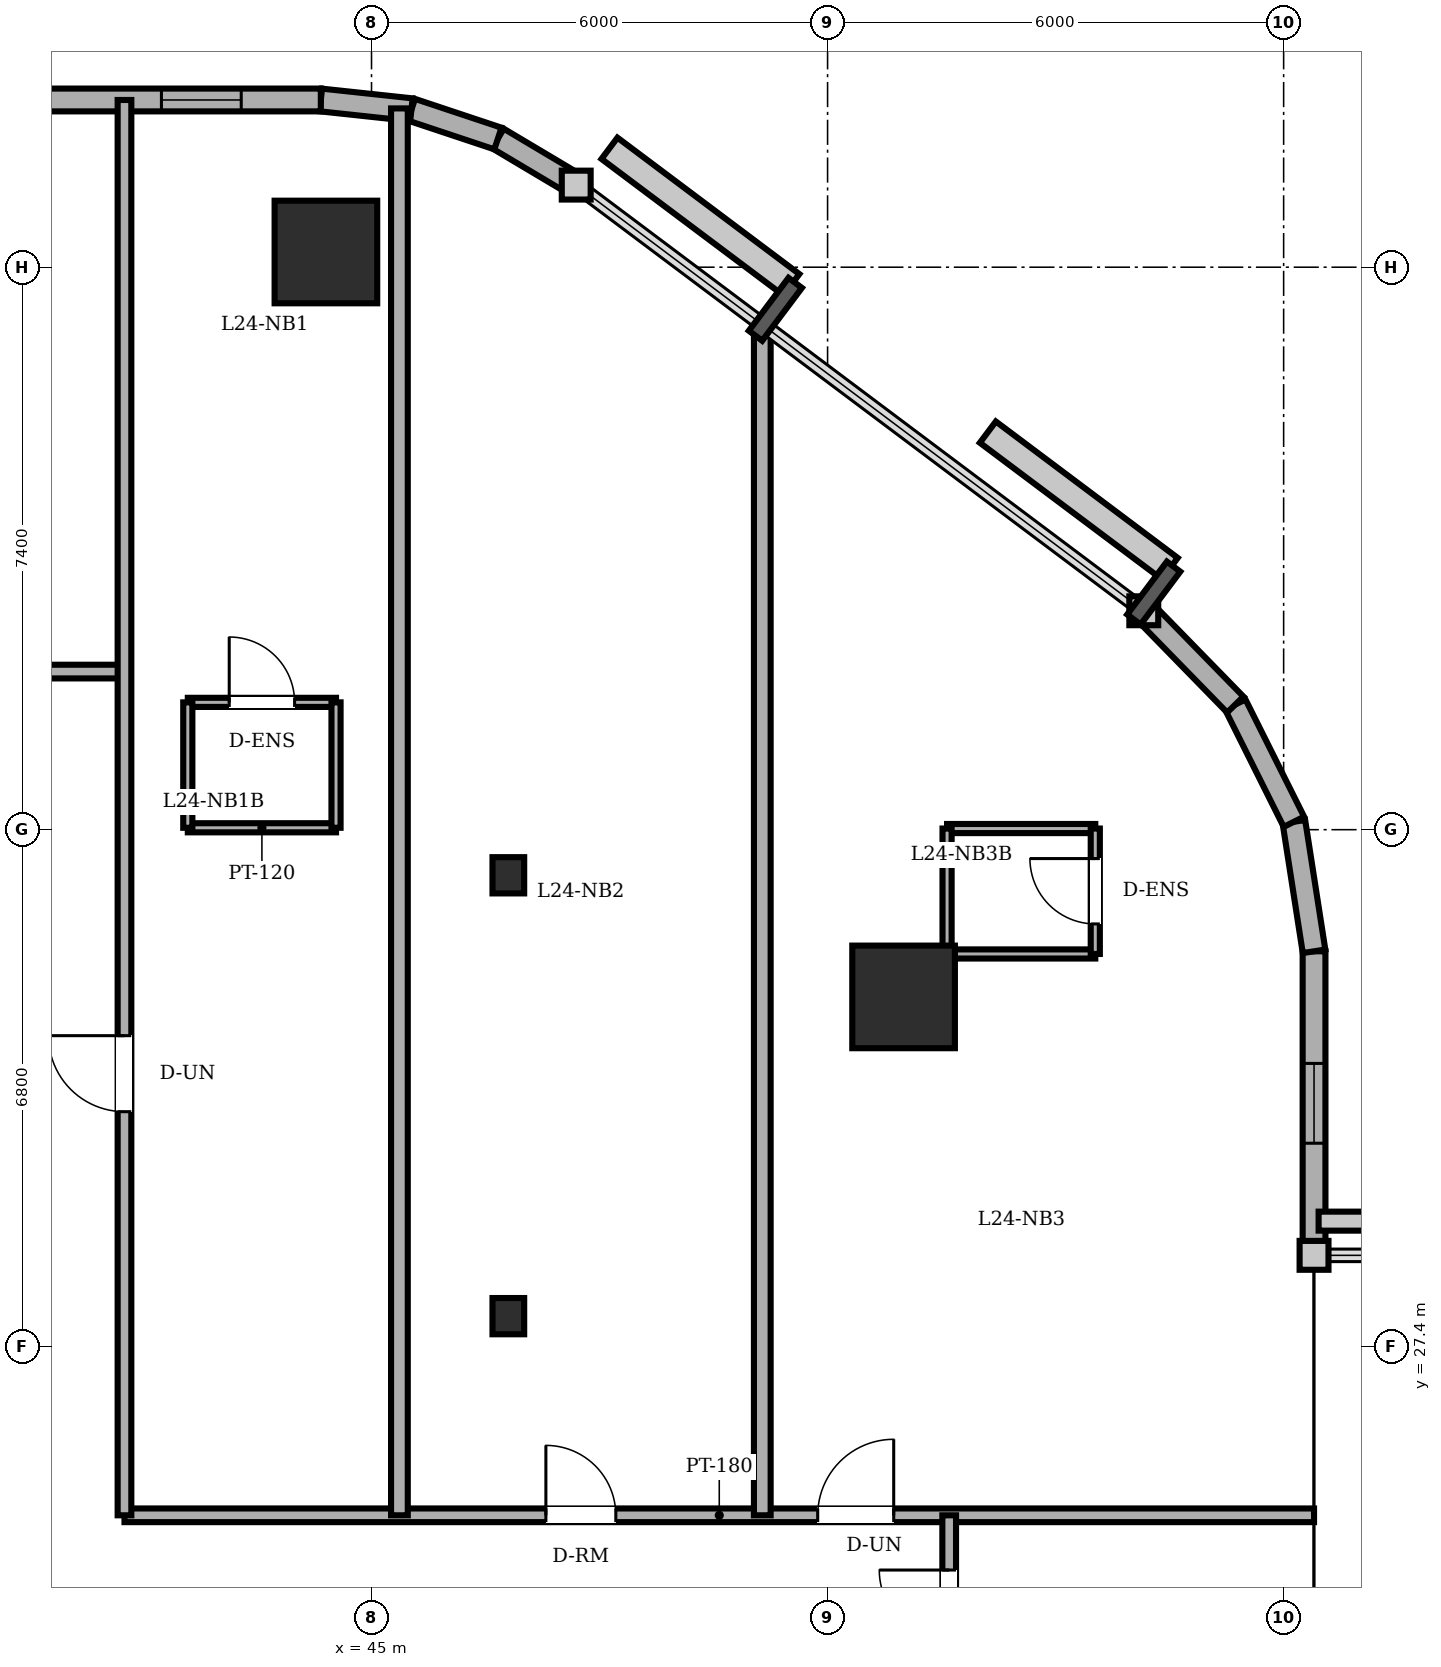
"""IFC4 building model, lengths in metres.
Left out: names, types, materials, properties, quantities, classifications, styles, units other than length and angle.
Written with IfcOpenShell. Run it as: python <this file> out.ifc"""

import sys

from ifc_helpers import new_model, si_unit, direction, frame, frame_2d, origin, origin_2d, place, context, subcontext, project, spatial, rectangle, circle, i_section, extrude, element, fill, save


model = new_model("IFC4")
c1 = context("Model", 3, precision=1e-05, world=origin(), true_north=direction((0.0, 1.0)))
c2 = subcontext(c1, "Body", "Model", "MODEL_VIEW")
j1 = project(units=[si_unit("LENGTHUNIT", "METRE"), si_unit("PLANEANGLEUNIT", "RADIAN")], contexts=[c1])
p1 = place(None, origin())
s1 = spatial("IfcSite", under=j1, at=p1, CompositionType="ELEMENT")
p2 = place(p1, origin())
s2 = spatial("IfcBuilding", under=s1, at=p2, CompositionType="ELEMENT")
p3 = place(p2, frame((0.0, 0.0, 93.5)))
s3 = spatial("IfcBuildingStorey", under=s2, at=p3, CompositionType="ELEMENT", Elevation=93.5)
for number, where, z_axis, x_axis in (
    (1, (52.0, 32.0, 0.0), (0.0, 0.0, 1.0), (1.0, 0.0, 0.0)),
    (2, (44.4, 41.8, 0.0), (0.0, 0.0, 1.0), (1.0, 0.0, 0.0)),
):
    element("IfcColumn", number, at=place(p3, frame(where, z_axis=z_axis, x_axis=x_axis)), inside=s3, PredefinedType="COLUMN", context=c2, shape_type="SweptSolid", body=[
        extrude(circle(Radius=0.675, at=origin_2d()), origin(), (0.0, 0.0, 1.0), 3.6),
    ])
for number, where, z_axis, x_axis in (
    (3, (46.8, 27.8, 0.0), (0.0, 0.0, 1.0), (1.0, 0.0, 0.0)),
    (4, (46.8, 33.6, 0.0), (0.0, 0.0, 1.0), (1.0, 0.0, 0.0)),
):
    element("IfcColumn", number, at=place(p3, frame(where, z_axis=z_axis, x_axis=x_axis)), inside=s3, PredefinedType="COLUMN", context=c2, shape_type="SweptSolid", body=[
        extrude(i_section(OverallWidth=0.417, OverallDepth=0.477, WebThickness=0.036, FlangeThickness=0.057, FilletRadius=0.015, at=origin_2d()), origin(), (0.0, 0.0, 1.0), 3.6),
    ])
p4 = place(p3, frame((57.4, 28.6, 0.0), z_axis=(0.0, 0.0, 1.0), x_axis=(0.0, 1.0, 0.0)))
e5 = element("IfcWall", 5, at=p4, inside=s3, PredefinedType="SOLIDWALL", context=c2, shape_type="SweptSolid", body=[
    extrude(rectangle(XDim=4.0, YDim=0.3, at=frame_2d((2.0, 0.0))), origin(), (0.0, 0.0, 1.0), 3.4),
])
p5 = place(p4, frame((1.475, 0.0, 0.85)))
e6 = element("IfcOpeningElement", 6, at=p5, cuts=e5, PredefinedType="OPENING", context=c2, shape_type="SweptSolid", body=[
    extrude(rectangle(XDim=1.05, YDim=1.55, at=frame_2d((0.525, 0.775))), frame((0.0, 0.16, 0.0), z_axis=(0.0, -1.0, 0.0), x_axis=(1.0, 0.0, 0.0)), (0.0, 0.0, 1.0), 0.32),
])
p6 = place(p3, frame((57.4, 32.6, 0.0), z_axis=(0.0, 0.0, 1.0), x_axis=(-0.153620989032, 0.988129845581, 0.0)))
e7 = element("IfcWall", 7, at=p6, inside=s3, PredefinedType="SOLIDWALL", context=c2, shape_type="SweptSolid", body=[
    extrude(rectangle(XDim=1.724, YDim=0.3, at=frame_2d((0.862, 0.0))), origin(), (0.0, 0.0, 1.0), 3.4),
])
for number, where, z_axis, x_axis in (
    (8, (57.135, 34.304, 0.0), (0.0, 0.0, 1.0), (-0.447, 0.894, 0.0)),
    (9, (56.364, 35.846, 0.0), (0.0, 0.0, 1.0), (-0.698, 0.716, 0.0)),
):
    element("IfcWall", number, at=place(p3, frame(where, z_axis=z_axis, x_axis=x_axis)), inside=s3, PredefinedType="SOLIDWALL", context=c2, shape_type="SweptSolid", body=[
        extrude(rectangle(XDim=1.724, YDim=0.3, at=frame_2d((0.862, 0.0))), origin(), (0.0, 0.0, 1.0), 3.4),
    ])
p7 = place(p3, frame((47.693, 42.68, 0.0), z_axis=(0.0, 0.0, 1.0), x_axis=(-0.859320591642, 0.511437308749, 0.0)))
e10 = element("IfcWall", 10, at=p7, inside=s3, PredefinedType="SOLIDWALL", context=c2, shape_type="SweptSolid", body=[
    extrude(rectangle(XDim=1.199, YDim=0.3, at=frame_2d((0.599, 0.0))), origin(), (0.0, 0.0, 1.0), 3.4),
])
p8 = place(p3, frame((46.663, 43.293, 0.0), z_axis=(0.0, 0.0, 1.0), x_axis=(-0.948744332129, 0.316044604847, 0.0)))
e11 = element("IfcWall", 11, at=p8, inside=s3, PredefinedType="SOLIDWALL", context=c2, shape_type="SweptSolid", body=[
    extrude(rectangle(XDim=1.2, YDim=0.3, at=frame_2d((0.6, 0.0))), origin(), (0.0, 0.0, 1.0), 3.4),
])
p9 = place(p3, frame((45.525, 43.672, 0.0), z_axis=(0.0, 0.0, 1.0), x_axis=(-0.994289103787, 0.106720092254, 0.0)))
e12 = element("IfcWall", 12, at=p9, inside=s3, PredefinedType="SOLIDWALL", context=c2, shape_type="SweptSolid", body=[
    extrude(rectangle(XDim=1.199, YDim=0.3, at=frame_2d((0.599, 0.0))), origin(), (0.0, 0.0, 1.0), 3.4),
])
p10 = place(p3, frame((44.333, 43.8, 0.0), z_axis=(0.0, 0.0, 1.0), x_axis=(-1.0, 0.0, 0.0)))
e13 = element("IfcWall", 13, at=p10, inside=s3, PredefinedType="SOLIDWALL", context=c2, shape_type="SweptSolid", body=[
    extrude(rectangle(XDim=29.933, YDim=0.3, at=frame_2d((14.967, 0.0))), origin(), (0.0, 0.0, 1.0), 3.4),
])
p11 = place(p10, frame((25.133, 0.0, 0.0)))
e14 = element("IfcOpeningElement", 14, at=p11, cuts=e13, PredefinedType="OPENING", context=c2, shape_type="SweptSolid", body=[
    extrude(rectangle(XDim=0.95, YDim=2.2, at=frame_2d((0.475, 1.1))), frame((0.0, 0.16, 0.0), z_axis=(0.0, -1.0, 0.0), x_axis=(1.0, 0.0, 0.0)), (0.0, 0.0, 1.0), 0.32),
])
p12 = place(p10, frame((5.541, 0.0, 0.85)))
e15 = element("IfcOpeningElement", 15, at=p12, cuts=e13, PredefinedType="OPENING", context=c2, shape_type="SweptSolid", body=[
    extrude(rectangle(XDim=1.65, YDim=1.55, at=frame_2d((0.825, 0.775))), frame((0.0, 0.16, 0.0), z_axis=(0.0, -1.0, 0.0), x_axis=(1.0, 0.0, 0.0)), (0.0, 0.0, 1.0), 0.32),
])
p13 = place(p10, frame((9.325, 0.0, 0.85)))
e16 = element("IfcOpeningElement", 16, at=p13, cuts=e13, PredefinedType="OPENING", context=c2, shape_type="SweptSolid", body=[
    extrude(rectangle(XDim=1.65, YDim=1.55, at=frame_2d((0.825, 0.775))), frame((0.0, 0.16, 0.0), z_axis=(0.0, -1.0, 0.0), x_axis=(1.0, 0.0, 0.0)), (0.0, 0.0, 1.0), 0.32),
])
p14 = place(p10, frame((15.508, 0.0, 0.85)))
e17 = element("IfcOpeningElement", 17, at=p14, cuts=e13, PredefinedType="OPENING", context=c2, shape_type="SweptSolid", body=[
    extrude(rectangle(XDim=1.65, YDim=1.55, at=frame_2d((0.825, 0.775))), frame((0.0, 0.16, 0.0), z_axis=(0.0, -1.0, 0.0), x_axis=(1.0, 0.0, 0.0)), (0.0, 0.0, 1.0), 0.32),
])
p15 = place(p10, frame((17.908, 0.0, 0.85)))
e18 = element("IfcOpeningElement", 18, at=p15, cuts=e13, PredefinedType="OPENING", context=c2, shape_type="SweptSolid", body=[
    extrude(rectangle(XDim=1.65, YDim=1.55, at=frame_2d((0.825, 0.775))), frame((0.0, 0.16, 0.0), z_axis=(0.0, -1.0, 0.0), x_axis=(1.0, 0.0, 0.0)), (0.0, 0.0, 1.0), 0.32),
])
p16 = place(p10, frame((23.125, 0.0, 0.85)))
e19 = element("IfcOpeningElement", 19, at=p16, cuts=e13, PredefinedType="OPENING", context=c2, shape_type="SweptSolid", body=[
    extrude(rectangle(XDim=1.65, YDim=1.55, at=frame_2d((0.825, 0.775))), frame((0.0, 0.16, 0.0), z_axis=(0.0, -1.0, 0.0), x_axis=(1.0, 0.0, 0.0)), (0.0, 0.0, 1.0), 0.32),
])
p17 = place(p10, frame((1.047, 0.0, 0.85)))
e20 = element("IfcOpeningElement", 20, at=p17, cuts=e13, PredefinedType="OPENING", context=c2, shape_type="SweptSolid", body=[
    extrude(rectangle(XDim=1.05, YDim=1.55, at=frame_2d((0.525, 0.775))), frame((0.0, 0.16, 0.0), z_axis=(0.0, -1.0, 0.0), x_axis=(1.0, 0.0, 0.0)), (0.0, 0.0, 1.0), 0.32),
])
p18 = place(p3, frame((42.583, 35.875, 0.0), z_axis=(0.0, 0.0, 1.0), x_axis=(1.0, 0.0, 0.0)))
e21 = element("IfcWall", 21, at=p18, inside=s3, PredefinedType="PARTITIONING", context=c2, shape_type="SweptSolid", body=[
    extrude(rectangle(XDim=1.95, YDim=0.12, at=frame_2d((0.975, 0.0))), origin(), (0.0, 0.0, 1.0), 3.4),
])
p19 = place(p18, frame((0.545, 0.0, 0.0)))
e22 = element("IfcOpeningElement", 22, at=p19, cuts=e21, PredefinedType="OPENING", context=c2, shape_type="SweptSolid", body=[
    extrude(rectangle(XDim=0.86, YDim=2.1, at=frame_2d((0.43, 1.05))), frame((0.0, 0.07, 0.0), z_axis=(0.0, -1.0, 0.0), x_axis=(1.0, 0.0, 0.0)), (0.0, 0.0, 1.0), 0.14),
])
p20 = place(p3, frame((44.533, 34.225, 0.0), z_axis=(0.0, 0.0, 1.0), x_axis=(-1.0, 0.0, 0.0)))
e23 = element("IfcWall", 23, at=p20, inside=s3, PredefinedType="PARTITIONING", context=c2, shape_type="SweptSolid", body=[
    extrude(rectangle(XDim=1.95, YDim=0.12, at=frame_2d((0.975, 0.0))), origin(), (0.0, 0.0, 1.0), 3.4),
])
for number, where, z_axis, x_axis in (
    (24, (42.583, 35.875, 0.0), (0.0, 0.0, 1.0), (0.0, -1.0, 0.0)),
    (25, (44.533, 34.225, 0.0), (0.0, 0.0, 1.0), (0.0, 1.0, 0.0)),
):
    element("IfcWall", number, at=place(p3, frame(where, z_axis=z_axis, x_axis=x_axis)), inside=s3, PredefinedType="PARTITIONING", context=c2, shape_type="SweptSolid", body=[
        extrude(rectangle(XDim=1.65, YDim=0.12, at=frame_2d((0.825, 0.0))), origin(), (0.0, 0.0, 1.0), 3.4),
    ])
for number, where, z_axis, x_axis in (
    (26, (52.572, 34.215, 0.0), (0.0, 0.0, 1.0), (1.0, 0.0, 0.0)),
    (27, (54.522, 32.565, 0.0), (0.0, 0.0, 1.0), (-1.0, 0.0, 0.0)),
):
    element("IfcWall", number, at=place(p3, frame(where, z_axis=z_axis, x_axis=x_axis)), inside=s3, PredefinedType="PARTITIONING", context=c2, shape_type="SweptSolid", body=[
        extrude(rectangle(XDim=1.95, YDim=0.12, at=frame_2d((0.975, 0.0))), origin(), (0.0, 0.0, 1.0), 3.4),
    ])
p21 = place(p3, frame((52.572, 34.215, 0.0), z_axis=(0.0, 0.0, 1.0), x_axis=(0.0, -1.0, 0.0)))
e28 = element("IfcWall", 28, at=p21, inside=s3, PredefinedType="PARTITIONING", context=c2, shape_type="SweptSolid", body=[
    extrude(rectangle(XDim=1.65, YDim=0.12, at=frame_2d((0.825, 0.0))), origin(), (0.0, 0.0, 1.0), 3.4),
])
p22 = place(p3, frame((54.522, 32.565, 0.0), z_axis=(0.0, 0.0, 1.0), x_axis=(0.0, 1.0, 0.0)))
e29 = element("IfcWall", 29, at=p22, inside=s3, PredefinedType="PARTITIONING", context=c2, shape_type="SweptSolid", body=[
    extrude(rectangle(XDim=1.65, YDim=0.12, at=frame_2d((0.825, 0.0))), origin(), (0.0, 0.0, 1.0), 3.4),
])
p23 = place(p22, frame((0.395, 0.0, 0.0)))
e30 = element("IfcOpeningElement", 30, at=p23, cuts=e29, PredefinedType="OPENING", context=c2, shape_type="SweptSolid", body=[
    extrude(rectangle(XDim=0.86, YDim=2.1, at=frame_2d((0.43, 1.05))), frame((0.0, 0.07, 0.0), z_axis=(0.0, -1.0, 0.0), x_axis=(1.0, 0.0, 0.0)), (0.0, 0.0, 1.0), 0.14),
])
p24 = place(p3, frame((41.75, 25.18, 0.0), z_axis=(0.0, 0.0, 1.0), x_axis=(1.0, 0.0, 0.0)))
e31 = element("IfcWall", 31, at=p24, inside=s3, PredefinedType="PARTITIONING", context=c2, shape_type="SweptSolid", body=[
    extrude(rectangle(XDim=15.65, YDim=0.18, at=frame_2d((7.825, 0.0))), origin(), (0.0, 0.0, 1.0), 3.4),
])
p25 = place(p24, frame((5.544, 0.0, 0.0)))
e32 = element("IfcOpeningElement", 32, at=p25, cuts=e31, PredefinedType="OPENING", context=c2, shape_type="SweptSolid", body=[
    extrude(rectangle(XDim=0.92, YDim=2.1, at=frame_2d((0.46, 1.05))), frame((0.0, 0.1, 0.0), z_axis=(0.0, -1.0, 0.0), x_axis=(1.0, 0.0, 0.0)), (0.0, 0.0, 1.0), 0.2),
])
p26 = place(p24, frame((9.12, 0.0, 0.0)))
e33 = element("IfcOpeningElement", 33, at=p26, cuts=e31, PredefinedType="OPENING", context=c2, shape_type="SweptSolid", body=[
    extrude(rectangle(XDim=1.0, YDim=2.15, at=frame_2d((0.5, 1.075))), frame((0.0, 0.1, 0.0), z_axis=(0.0, -1.0, 0.0), x_axis=(1.0, 0.0, 0.0)), (0.0, 0.0, 1.0), 0.2),
])
p27 = place(p3, frame((8.8, 36.28, 0.0), z_axis=(0.0, 0.0, 1.0), x_axis=(1.0, 0.0, 0.0)))
e34 = element("IfcWall", 34, at=p27, inside=s3, PredefinedType="PARTITIONING", context=c2, shape_type="SweptSolid", body=[
    extrude(rectangle(XDim=32.95, YDim=0.18, at=frame_2d((16.475, 0.0))), origin(), (0.0, 0.0, 1.0), 3.4),
])
p28 = place(p27, frame((15.65, 0.0, 0.0)))
e35 = element("IfcOpeningElement", 35, at=p28, cuts=e34, PredefinedType="OPENING", context=c2, shape_type="SweptSolid", body=[
    extrude(rectangle(XDim=0.9, YDim=2.1, at=frame_2d((0.45, 1.05))), frame((0.0, 0.1, 0.0), z_axis=(0.0, -1.0, 0.0), x_axis=(1.0, 0.0, 0.0)), (0.0, 0.0, 1.0), 0.2),
])
p29 = place(p27, frame((19.27, 0.0, 0.0)))
e36 = element("IfcOpeningElement", 36, at=p29, cuts=e34, PredefinedType="OPENING", context=c2, shape_type="SweptSolid", body=[
    extrude(rectangle(XDim=0.86, YDim=2.1, at=frame_2d((0.43, 1.05))), frame((0.0, 0.1, 0.0), z_axis=(0.0, -1.0, 0.0), x_axis=(1.0, 0.0, 0.0)), (0.0, 0.0, 1.0), 0.2),
])
p30 = place(p27, frame((7.3, 0.0, 0.0)))
e37 = element("IfcOpeningElement", 37, at=p30, cuts=e34, PredefinedType="OPENING", context=c2, shape_type="SweptSolid", body=[
    extrude(rectangle(XDim=1.0, YDim=2.15, at=frame_2d((0.5, 1.075))), frame((0.0, 0.1, 0.0), z_axis=(0.0, -1.0, 0.0), x_axis=(1.0, 0.0, 0.0)), (0.0, 0.0, 1.0), 0.2),
])
p31 = place(p27, frame((26.555, 0.0, 0.0)))
e38 = element("IfcOpeningElement", 38, at=p31, cuts=e34, PredefinedType="OPENING", context=c2, shape_type="SweptSolid", body=[
    extrude(rectangle(XDim=0.92, YDim=2.1, at=frame_2d((0.46, 1.05))), frame((0.0, 0.1, 0.0), z_axis=(0.0, -1.0, 0.0), x_axis=(1.0, 0.0, 0.0)), (0.0, 0.0, 1.0), 0.2),
])
p32 = place(p3, frame((41.75, 25.18, 0.0), z_axis=(0.0, 0.0, 1.0), x_axis=(0.0, 1.0, 0.0)))
e39 = element("IfcWall", 39, at=p32, inside=s3, PredefinedType="PARTITIONING", context=c2, shape_type="SweptSolid", body=[
    extrude(rectangle(XDim=18.62, YDim=0.18, at=frame_2d((9.31, 0.0))), origin(), (0.0, 0.0, 1.0), 3.4),
])
p33 = place(p32, frame((5.31, 0.0, 0.0)))
e40 = element("IfcOpeningElement", 40, at=p33, cuts=e39, PredefinedType="OPENING", context=c2, shape_type="SweptSolid", body=[
    extrude(rectangle(XDim=1.0, YDim=2.15, at=frame_2d((0.5, 1.075))), frame((0.0, 0.1, 0.0), z_axis=(0.0, -1.0, 0.0), x_axis=(1.0, 0.0, 0.0)), (0.0, 0.0, 1.0), 0.2),
])
p34 = place(p3, frame((45.367, 25.18, 0.0), z_axis=(0.0, 0.0, 1.0), x_axis=(0.0, 1.0, 0.0)))
e41 = element("IfcWall", 41, at=p34, inside=s3, PredefinedType="PARTITIONING", context=c2, shape_type="SweptSolid", body=[
    extrude(rectangle(XDim=18.509, YDim=0.22, at=frame_2d((9.254, 0.0))), origin(), (0.0, 0.0, 1.0), 2.882),
])
p35 = place(p3, frame((50.141, 25.18, 0.0), z_axis=(0.0, 0.0, 1.0), x_axis=(0.0, 1.0, 0.0)))
e42 = element("IfcWall", 42, at=p35, inside=s3, PredefinedType="PARTITIONING", context=c2, shape_type="SweptSolid", body=[
    extrude(rectangle(XDim=15.664, YDim=0.22, at=frame_2d((7.832, 0.0))), origin(), (0.0, 0.0, 1.0), 3.4),
])
p36 = place(p3, frame((52.6, 22.82, 0.0), z_axis=(0.0, 0.0, 1.0), x_axis=(0.0, 1.0, 0.0)))
e43 = element("IfcWall", 43, at=p36, inside=s3, PredefinedType="PARTITIONING", context=c2, shape_type="SweptSolid", body=[
    extrude(rectangle(XDim=2.36, YDim=0.18, at=frame_2d((1.18, 0.0))), origin(), (0.0, 0.0, 1.0), 3.4),
])
p37 = place(p36, frame((0.72, 0.0, 0.0)))
e44 = element("IfcOpeningElement", 44, at=p37, cuts=e43, PredefinedType="OPENING", context=c2, shape_type="SweptSolid", body=[
    extrude(rectangle(XDim=0.92, YDim=2.1, at=frame_2d((0.46, 1.05))), frame((0.0, 0.1, 0.0), z_axis=(0.0, -1.0, 0.0), x_axis=(1.0, 0.0, 0.0)), (0.0, 0.0, 1.0), 0.2),
])
p38 = place(p5, origin())
e45 = element("IfcWindow", 45, at=p38, inside=s3, PartitioningType="SINGLE_PANEL", PredefinedType="WINDOW", context=c2, shape_type="SweptSolid", body=[
    extrude(rectangle(XDim=1.05, YDim=1.55, at=frame_2d((0.525, 0.775))), frame((0.0, 0.03, 0.0), z_axis=(0.0, -1.0, 0.0), x_axis=(1.0, 0.0, 0.0)), (0.0, 0.0, 1.0), 0.06),
])
fill(e6, e45)
p39 = place(p17, origin())
e46 = element("IfcWindow", 46, at=p39, inside=s3, PartitioningType="SINGLE_PANEL", PredefinedType="WINDOW", context=c2, shape_type="SweptSolid", body=[
    extrude(rectangle(XDim=1.05, YDim=1.55, at=frame_2d((0.525, 0.775))), frame((0.0, 0.03, 0.0), z_axis=(0.0, -1.0, 0.0), x_axis=(1.0, 0.0, 0.0)), (0.0, 0.0, 1.0), 0.06),
])
fill(e20, e46)
p40 = place(p19, origin())
e47 = element("IfcDoor", 47, at=p40, inside=s3, OperationType="SINGLE_SWING_LEFT", PredefinedType="DOOR", context=c2, shape_type="SweptSolid", body=[
    extrude(rectangle(XDim=0.86, YDim=2.1, at=frame_2d((0.43, 1.05))), frame((0.0, 0.025, 0.0), z_axis=(0.0, -1.0, 0.0), x_axis=(1.0, 0.0, 0.0)), (0.0, 0.0, 1.0), 0.05),
])
fill(e22, e47)
p41 = place(p23, origin())
e48 = element("IfcDoor", 48, at=p41, inside=s3, OperationType="SINGLE_SWING_RIGHT", PredefinedType="DOOR", context=c2, shape_type="SweptSolid", body=[
    extrude(rectangle(XDim=0.86, YDim=2.1, at=frame_2d((0.43, 1.05))), frame((0.0, 0.025, 0.0), z_axis=(0.0, -1.0, 0.0), x_axis=(1.0, 0.0, 0.0)), (0.0, 0.0, 1.0), 0.05),
])
fill(e30, e48)
p42 = place(p33, origin())
e49 = element("IfcDoor", 49, at=p42, inside=s3, OperationType="SINGLE_SWING_RIGHT", PredefinedType="DOOR", context=c2, shape_type="SweptSolid", body=[
    extrude(rectangle(XDim=1.0, YDim=2.15, at=frame_2d((0.5, 1.075))), frame((0.0, 0.025, 0.0), z_axis=(0.0, -1.0, 0.0), x_axis=(1.0, 0.0, 0.0)), (0.0, 0.0, 1.0), 0.05),
])
fill(e40, e49)
p43 = place(p25, origin())
e50 = element("IfcDoor", 50, at=p43, inside=s3, OperationType="SINGLE_SWING_LEFT", PredefinedType="DOOR", context=c2, shape_type="SweptSolid", body=[
    extrude(rectangle(XDim=0.92, YDim=2.1, at=frame_2d((0.46, 1.05))), frame((0.0, 0.025, 0.0), z_axis=(0.0, -1.0, 0.0), x_axis=(1.0, 0.0, 0.0)), (0.0, 0.0, 1.0), 0.05),
])
fill(e32, e50)
p44 = place(p26, origin())
e51 = element("IfcDoor", 51, at=p44, inside=s3, OperationType="SINGLE_SWING_RIGHT", PredefinedType="DOOR", context=c2, shape_type="SweptSolid", body=[
    extrude(rectangle(XDim=1.0, YDim=2.15, at=frame_2d((0.5, 1.075))), frame((0.0, 0.025, 0.0), z_axis=(0.0, -1.0, 0.0), x_axis=(1.0, 0.0, 0.0)), (0.0, 0.0, 1.0), 0.05),
])
fill(e33, e51)
p45 = place(p37, origin())
e52 = element("IfcDoor", 52, at=p45, inside=s3, OperationType="SINGLE_SWING_RIGHT", PredefinedType="DOOR", context=c2, shape_type="SweptSolid", body=[
    extrude(rectangle(XDim=0.92, YDim=2.1, at=frame_2d((0.46, 1.05))), frame((0.0, 0.025, 0.0), z_axis=(0.0, -1.0, 0.0), x_axis=(1.0, 0.0, 0.0)), (0.0, 0.0, 1.0), 0.05),
])
fill(e44, e52)
save(model, sys.argv[1])
